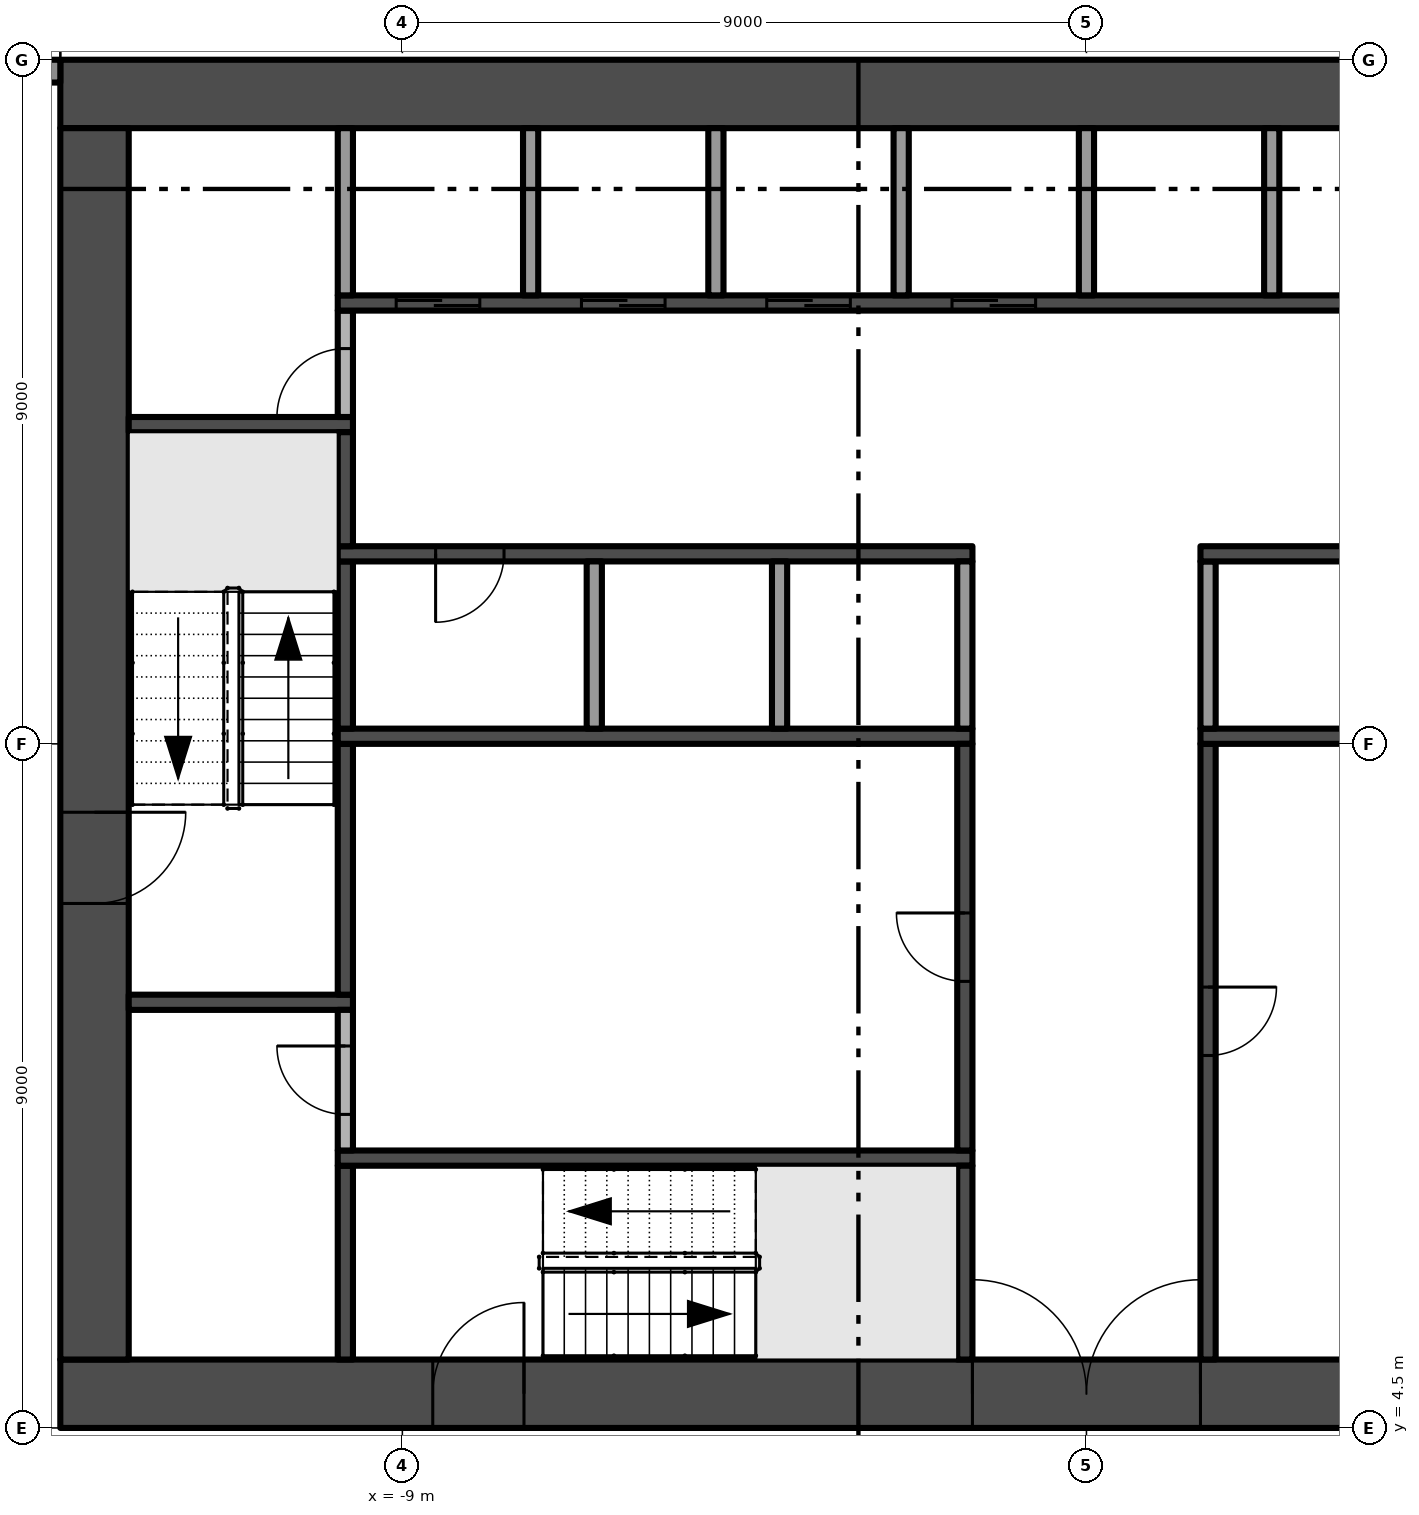
"""IFC4 building model, lengths in metres.
Left out: names, types, materials, properties, quantities, classifications, styles, units other than length and angle.
Written with IfcOpenShell. Run it as: python <this file> out.ifc"""

import sys

from ifc_helpers import new_model, si_unit, direction, frame, frame_2d, origin, place, context, subcontext, project, spatial, rectangle, extrude, element, fill, save


model = new_model("IFC4")
c1 = context("Model", 3, precision=1e-05, world=origin(), true_north=direction((0.0, 1.0)))
c2 = subcontext(c1, "Body", "Model", "MODEL_VIEW")
j1 = project(units=[si_unit("LENGTHUNIT", "METRE"), si_unit("PLANEANGLEUNIT", "RADIAN")], contexts=[c1])
p1 = place(None, origin())
s1 = spatial("IfcSite", under=j1, at=p1, CompositionType="ELEMENT")
p2 = place(p1, origin())
s2 = spatial("IfcBuilding", under=s1, at=p2, CompositionType="ELEMENT")
p3 = place(p2, frame((0.0, 0.0, 26.4)))
s3 = spatial("IfcBuildingStorey", under=s2, at=p3, CompositionType="ELEMENT", Elevation=26.4)
p4 = place(p3, frame((-13.5, 4.95, -0.3), z_axis=(0.0, 0.0, 1.0), x_axis=(1.0, 0.0, 0.0)))
e1 = element("IfcWall", 1, at=p4, inside=s3, PredefinedType="SHEAR", context=c2, shape_type="SweptSolid", body=[
    extrude(rectangle(XDim=27.0, YDim=0.9, at=frame_2d((13.5, 0.0))), origin(), (0.0, 0.0, 1.0), 3.8),
])
p5 = place(p4, frame((12.0, 0.0, 0.3)))
e2 = element("IfcOpeningElement", 2, at=p5, cuts=e1, PredefinedType="OPENING", context=c2, shape_type="SweptSolid", body=[
    extrude(rectangle(XDim=3.0, YDim=2.4, at=frame_2d((1.5, 1.2))), frame((0.0, 0.46, 0.0), z_axis=(0.0, -1.0, 0.0), x_axis=(1.0, 0.0, 0.0)), (0.0, 0.0, 1.0), 0.92),
])
p6 = place(p4, frame((4.9, 0.0, 0.3)))
e3 = element("IfcOpeningElement", 3, at=p6, cuts=e1, PredefinedType="OPENING", context=c2, shape_type="SweptSolid", body=[
    extrude(rectangle(XDim=1.2, YDim=2.2, at=frame_2d((0.6, 1.1))), frame((0.0, 0.46, 0.0), z_axis=(0.0, -1.0, 0.0), x_axis=(1.0, 0.0, 0.0)), (0.0, 0.0, 1.0), 0.92),
])
p7 = place(p4, frame((20.75, 0.0, 0.3)))
e4 = element("IfcOpeningElement", 4, at=p7, cuts=e1, PredefinedType="OPENING", context=c2, shape_type="SweptSolid", body=[
    extrude(rectangle(XDim=1.5, YDim=2.2, at=frame_2d((0.75, 1.1))), frame((0.0, 0.46, 0.0), z_axis=(0.0, -1.0, 0.0), x_axis=(1.0, 0.0, 0.0)), (0.0, 0.0, 1.0), 0.92),
])
p8 = place(p4, frame((17.4, 0.0, 0.3)))
e5 = element("IfcOpeningElement", 5, at=p8, cuts=e1, PredefinedType="OPENING", context=c2, shape_type="SweptSolid", body=[
    extrude(rectangle(XDim=1.2, YDim=2.2, at=frame_2d((0.6, 1.1))), frame((0.0, 0.46, 0.0), z_axis=(0.0, -1.0, 0.0), x_axis=(1.0, 0.0, 0.0)), (0.0, 0.0, 1.0), 0.92),
])
p9 = place(p3, frame((13.5, 22.05, -0.3), z_axis=(0.0, 0.0, 1.0), x_axis=(-1.0, 0.0, 0.0)))
e6 = element("IfcWall", 6, at=p9, inside=s3, PredefinedType="SHEAR", context=c2, shape_type="SweptSolid", body=[
    extrude(rectangle(XDim=27.0, YDim=0.9, at=frame_2d((13.5, 0.0))), origin(), (0.0, 0.0, 1.0), 3.8),
])
p10 = place(p3, frame((-13.05, 21.6, -0.3), z_axis=(0.0, 0.0, 1.0), x_axis=(0.0, -1.0, 0.0)))
e7 = element("IfcWall", 7, at=p10, inside=s3, PredefinedType="SHEAR", context=c2, shape_type="SweptSolid", body=[
    extrude(rectangle(XDim=16.2, YDim=0.9, at=frame_2d((8.1, 0.0))), origin(), (0.0, 0.0, 1.0), 3.8),
])
p11 = place(p10, frame((9.0, 0.0, 0.3)))
e8 = element("IfcOpeningElement", 8, at=p11, cuts=e7, PredefinedType="OPENING", context=c2, shape_type="SweptSolid", body=[
    extrude(rectangle(XDim=1.2, YDim=2.2, at=frame_2d((0.6, 1.1))), frame((0.0, 0.46, 0.0), z_axis=(0.0, -1.0, 0.0), x_axis=(1.0, 0.0, 0.0)), (0.0, 0.0, 1.0), 0.92),
])
p12 = place(p3, frame((-17.275, 22.35, 0.0), z_axis=(0.0, 0.0, 1.0), x_axis=(1.0, 0.0, 0.0)))
e9 = element("IfcWall", 9, at=p12, inside=s3, PredefinedType="SOLIDWALL", context=c2, shape_type="SweptSolid", body=[
    extrude(rectangle(XDim=3.775, YDim=0.3, at=frame_2d((1.887, 0.0))), origin(), (0.0, 0.0, 1.0), 3.5),
])
p13 = place(p12, frame((0.525, 0.0, 0.0)))
e10 = element("IfcOpeningElement", 10, at=p13, cuts=e9, PredefinedType="OPENING", context=c2, shape_type="SweptSolid", body=[
    extrude(rectangle(XDim=2.4, YDim=2.4, at=frame_2d((1.2, 1.2))), frame((0.0, 0.16, 0.0), z_axis=(0.0, -1.0, 0.0), x_axis=(1.0, 0.0, 0.0)), (0.0, 0.0, 1.0), 0.32),
])
for number, where, z_axis, x_axis in (
    (11, (-12.6, 10.1, 0.0), (0.0, 0.0, 1.0), (1.0, 0.0, 0.0)),
    (12, (-12.6, 17.7, 0.0), (0.0, 0.0, 1.0), (1.0, 0.0, 0.0)),
):
    element("IfcWall", number, at=place(p3, frame(where, z_axis=z_axis, x_axis=x_axis)), inside=s3, PredefinedType="SHEAR", context=c2, shape_type="SweptSolid", body=[
        extrude(rectangle(XDim=2.95, YDim=0.2, at=frame_2d((1.475, 0.0))), origin(), (0.0, 0.0, 1.0), 3.5),
    ])
p14 = place(p3, frame((-9.75, 5.4, 0.0), z_axis=(0.0, 0.0, 1.0), x_axis=(0.0, 1.0, 0.0)))
e13 = element("IfcWall", 13, at=p14, inside=s3, PredefinedType="SHEAR", context=c2, shape_type="SweptSolid", body=[
    extrude(rectangle(XDim=2.55, YDim=0.2, at=frame_2d((1.275, 0.0))), origin(), (0.0, 0.0, 1.0), 3.5),
])
p15 = place(p3, frame((-9.85, 8.05, 0.0), z_axis=(0.0, 0.0, 1.0), x_axis=(1.0, 0.0, 0.0)))
e14 = element("IfcWall", 14, at=p15, inside=s3, PredefinedType="SHEAR", context=c2, shape_type="SweptSolid", body=[
    extrude(rectangle(XDim=8.35, YDim=0.2, at=frame_2d((4.175, 0.0))), origin(), (0.0, 0.0, 1.0), 3.5),
])
p16 = place(p3, frame((-9.75, 8.15, 0.0), z_axis=(0.0, 0.0, 1.0), x_axis=(0.0, 1.0, 0.0)))
e15 = element("IfcWall", 15, at=p16, inside=s3, PredefinedType="PARTITIONING", context=c2, shape_type="SweptSolid", body=[
    extrude(rectangle(XDim=1.85, YDim=0.2, at=frame_2d((0.925, 0.0))), origin(), (0.0, 0.0, 1.0), 3.5),
])
p17 = place(p16, frame((0.475, 0.0, 0.0)))
e16 = element("IfcOpeningElement", 16, at=p17, cuts=e15, PredefinedType="OPENING", context=c2, shape_type="SweptSolid", body=[
    extrude(rectangle(XDim=0.9, YDim=2.1, at=frame_2d((0.45, 1.05))), frame((0.0, 0.11, 0.0), z_axis=(0.0, -1.0, 0.0), x_axis=(1.0, 0.0, 0.0)), (0.0, 0.0, 1.0), 0.22),
])
p18 = place(p3, frame((-9.75, 10.2, 0.0), z_axis=(0.0, 0.0, 1.0), x_axis=(0.0, 1.0, 0.0)))
e17 = element("IfcWall", 17, at=p18, inside=s3, PredefinedType="SHEAR", context=c2, shape_type="SweptSolid", body=[
    extrude(rectangle(XDim=3.3, YDim=0.2, at=frame_2d((1.65, 0.0))), origin(), (0.0, 0.0, 1.0), 3.5),
])
p19 = place(p3, frame((-9.85, 13.6, 0.0), z_axis=(0.0, 0.0, 1.0), x_axis=(1.0, 0.0, 0.0)))
e18 = element("IfcWall", 18, at=p19, inside=s3, PredefinedType="SHEAR", context=c2, shape_type="SweptSolid", body=[
    extrude(rectangle(XDim=8.35, YDim=0.2, at=frame_2d((4.175, 0.0))), origin(), (0.0, 0.0, 1.0), 3.5),
])
p20 = place(p3, frame((-9.75, 13.7, 0.0), z_axis=(0.0, 0.0, 1.0), x_axis=(0.0, 1.0, 0.0)))
e19 = element("IfcWall", 19, at=p20, inside=s3, PredefinedType="SHEAR", context=c2, shape_type="SweptSolid", body=[
    extrude(rectangle(XDim=2.2, YDim=0.2, at=frame_2d((1.1, 0.0))), origin(), (0.0, 0.0, 1.0), 3.5),
])
p21 = place(p3, frame((-1.5, 16.0, 0.0), z_axis=(0.0, 0.0, 1.0), x_axis=(-1.0, 0.0, 0.0)))
e20 = element("IfcWall", 20, at=p21, inside=s3, PredefinedType="SHEAR", context=c2, shape_type="SweptSolid", body=[
    extrude(rectangle(XDim=8.35, YDim=0.2, at=frame_2d((4.175, 0.0))), origin(), (0.0, 0.0, 1.0), 3.5),
])
p22 = place(p21, frame((6.162, 0.0, 0.0)))
e21 = element("IfcOpeningElement", 21, at=p22, cuts=e20, PredefinedType="OPENING", context=c2, shape_type="SweptSolid", body=[
    extrude(rectangle(XDim=0.9, YDim=2.1, at=frame_2d((0.45, 1.05))), frame((0.0, 0.11, 0.0), z_axis=(0.0, -1.0, 0.0), x_axis=(1.0, 0.0, 0.0)), (0.0, 0.0, 1.0), 0.22),
])
p23 = place(p3, frame((-9.75, 16.1, 0.0), z_axis=(0.0, 0.0, 1.0), x_axis=(0.0, 1.0, 0.0)))
e22 = element("IfcWall", 22, at=p23, inside=s3, PredefinedType="SHEAR", context=c2, shape_type="SweptSolid", body=[
    extrude(rectangle(XDim=1.5, YDim=0.2, at=frame_2d((0.75, 0.0))), origin(), (0.0, 0.0, 1.0), 3.5),
])
p24 = place(p3, frame((-9.75, 17.8, 0.0), z_axis=(0.0, 0.0, 1.0), x_axis=(0.0, 1.0, 0.0)))
e23 = element("IfcWall", 23, at=p24, inside=s3, PredefinedType="PARTITIONING", context=c2, shape_type="SweptSolid", body=[
    extrude(rectangle(XDim=1.4, YDim=0.2, at=frame_2d((0.7, 0.0))), origin(), (0.0, 0.0, 1.0), 3.5),
])
p25 = place(p24, origin())
e24 = element("IfcOpeningElement", 24, at=p25, cuts=e23, PredefinedType="OPENING", context=c2, shape_type="SweptSolid", body=[
    extrude(rectangle(XDim=0.9, YDim=2.1, at=frame_2d((0.45, 1.05))), frame((0.0, 0.11, 0.0), z_axis=(0.0, -1.0, 0.0), x_axis=(1.0, 0.0, 0.0)), (0.0, 0.0, 1.0), 0.22),
])
p26 = place(p3, frame((-9.85, 19.3, 0.0), z_axis=(0.0, 0.0, 1.0), x_axis=(1.0, 0.0, 0.0)))
e25 = element("IfcWall", 25, at=p26, inside=s3, PredefinedType="SHEAR", context=c2, shape_type="SweptSolid", body=[
    extrude(rectangle(XDim=19.7, YDim=0.2, at=frame_2d((9.85, 0.0))), origin(), (0.0, 0.0, 1.0), 3.5),
])
p27 = place(p26, frame((0.769, 0.0, 0.0)))
e26 = element("IfcOpeningElement", 26, at=p27, cuts=e25, PredefinedType="OPENING", context=c2, shape_type="SweptSolid", body=[
    extrude(rectangle(XDim=1.1, YDim=2.1, at=frame_2d((0.55, 1.05))), frame((0.0, 0.11, 0.0), z_axis=(0.0, -1.0, 0.0), x_axis=(1.0, 0.0, 0.0)), (0.0, 0.0, 1.0), 0.22),
])
p28 = place(p26, frame((3.206, 0.0, 0.0)))
e27 = element("IfcOpeningElement", 27, at=p28, cuts=e25, PredefinedType="OPENING", context=c2, shape_type="SweptSolid", body=[
    extrude(rectangle(XDim=1.1, YDim=2.1, at=frame_2d((0.55, 1.05))), frame((0.0, 0.11, 0.0), z_axis=(0.0, -1.0, 0.0), x_axis=(1.0, 0.0, 0.0)), (0.0, 0.0, 1.0), 0.22),
])
p29 = place(p26, frame((5.644, 0.0, 0.0)))
e28 = element("IfcOpeningElement", 28, at=p29, cuts=e25, PredefinedType="OPENING", context=c2, shape_type="SweptSolid", body=[
    extrude(rectangle(XDim=1.1, YDim=2.1, at=frame_2d((0.55, 1.05))), frame((0.0, 0.11, 0.0), z_axis=(0.0, -1.0, 0.0), x_axis=(1.0, 0.0, 0.0)), (0.0, 0.0, 1.0), 0.22),
])
p30 = place(p26, frame((8.081, 0.0, 0.0)))
e29 = element("IfcOpeningElement", 29, at=p30, cuts=e25, PredefinedType="OPENING", context=c2, shape_type="SweptSolid", body=[
    extrude(rectangle(XDim=1.1, YDim=2.1, at=frame_2d((0.55, 1.05))), frame((0.0, 0.11, 0.0), z_axis=(0.0, -1.0, 0.0), x_axis=(1.0, 0.0, 0.0)), (0.0, 0.0, 1.0), 0.22),
])
for number, where, z_axis, x_axis in (
    (30, (-9.75, 19.4, 0.0), (0.0, 0.0, 1.0), (0.0, 1.0, 0.0)),
    (31, (-7.312, 19.4, 0.0), (0.0, 0.0, 1.0), (0.0, 1.0, 0.0)),
    (32, (-6.475, 13.7, 0.0), (0.0, 0.0, 1.0), (0.0, 1.0, 0.0)),
    (33, (-4.875, 19.4, 0.0), (0.0, 0.0, 1.0), (0.0, 1.0, 0.0)),
    (34, (-4.037, 13.7, 0.0), (0.0, 0.0, 1.0), (0.0, 1.0, 0.0)),
    (35, (-2.438, 19.4, 0.0), (0.0, 0.0, 1.0), (0.0, 1.0, 0.0)),
):
    element("IfcWall", number, at=place(p3, frame(where, z_axis=z_axis, x_axis=x_axis)), inside=s3, PredefinedType="PARTITIONING", context=c2, shape_type="SweptSolid", body=[
        extrude(rectangle(XDim=2.2, YDim=0.2, at=frame_2d((1.1, 0.0))), origin(), (0.0, 0.0, 1.0), 3.5),
    ])
p31 = place(p3, frame((-1.6, 5.4, 0.0), z_axis=(0.0, 0.0, 1.0), x_axis=(0.0, 1.0, 0.0)))
e36 = element("IfcWall", 36, at=p31, inside=s3, PredefinedType="SHEAR", context=c2, shape_type="SweptSolid", body=[
    extrude(rectangle(XDim=2.55, YDim=0.2, at=frame_2d((1.275, 0.0))), origin(), (0.0, 0.0, 1.0), 3.5),
])
p32 = place(p3, frame((-1.6, 8.15, 0.0), z_axis=(0.0, 0.0, 1.0), x_axis=(0.0, 1.0, 0.0)))
e37 = element("IfcWall", 37, at=p32, inside=s3, PredefinedType="SHEAR", context=c2, shape_type="SweptSolid", body=[
    extrude(rectangle(XDim=5.35, YDim=0.2, at=frame_2d((2.675, 0.0))), origin(), (0.0, 0.0, 1.0), 3.5),
])
p33 = place(p32, frame((2.225, 0.0, 0.0)))
e38 = element("IfcOpeningElement", 38, at=p33, cuts=e37, PredefinedType="OPENING", context=c2, shape_type="SweptSolid", body=[
    extrude(rectangle(XDim=0.9, YDim=2.1, at=frame_2d((0.45, 1.05))), frame((0.0, 0.11, 0.0), z_axis=(0.0, -1.0, 0.0), x_axis=(1.0, 0.0, 0.0)), (0.0, 0.0, 1.0), 0.22),
])
for number, where, z_axis, x_axis in (
    (39, (-1.6, 13.7, 0.0), (0.0, 0.0, 1.0), (0.0, 1.0, 0.0)),
    (40, (0.0, 19.4, 0.0), (0.0, 0.0, 1.0), (0.0, 1.0, 0.0)),
):
    element("IfcWall", number, at=place(p3, frame(where, z_axis=z_axis, x_axis=x_axis)), inside=s3, PredefinedType="PARTITIONING", context=c2, shape_type="SweptSolid", body=[
        extrude(rectangle(XDim=2.2, YDim=0.2, at=frame_2d((1.1, 0.0))), origin(), (0.0, 0.0, 1.0), 3.5),
    ])
p34 = place(p3, frame((1.6, 13.5, 0.0), z_axis=(0.0, 0.0, 1.0), x_axis=(0.0, -1.0, 0.0)))
e41 = element("IfcWall", 41, at=p34, inside=s3, PredefinedType="SHEAR", context=c2, shape_type="SweptSolid", body=[
    extrude(rectangle(XDim=8.1, YDim=0.2, at=frame_2d((4.05, 0.0))), origin(), (0.0, 0.0, 1.0), 3.5),
])
p35 = place(p34, frame((3.2, 0.0, 0.0)))
e42 = element("IfcOpeningElement", 42, at=p35, cuts=e41, PredefinedType="OPENING", context=c2, shape_type="SweptSolid", body=[
    extrude(rectangle(XDim=0.9, YDim=2.1, at=frame_2d((0.45, 1.05))), frame((0.0, 0.11, 0.0), z_axis=(0.0, -1.0, 0.0), x_axis=(1.0, 0.0, 0.0)), (0.0, 0.0, 1.0), 0.22),
])
p36 = place(p3, frame((1.5, 13.6, 0.0), z_axis=(0.0, 0.0, 1.0), x_axis=(1.0, 0.0, 0.0)))
e43 = element("IfcWall", 43, at=p36, inside=s3, PredefinedType="SHEAR", context=c2, shape_type="SweptSolid", body=[
    extrude(rectangle(XDim=5.075, YDim=0.2, at=frame_2d((2.538, 0.0))), origin(), (0.0, 0.0, 1.0), 3.5),
])
p37 = place(p3, frame((1.6, 13.7, 0.0), z_axis=(0.0, 0.0, 1.0), x_axis=(0.0, 1.0, 0.0)))
e44 = element("IfcWall", 44, at=p37, inside=s3, PredefinedType="PARTITIONING", context=c2, shape_type="SweptSolid", body=[
    extrude(rectangle(XDim=2.2, YDim=0.2, at=frame_2d((1.1, 0.0))), origin(), (0.0, 0.0, 1.0), 3.5),
])
p38 = place(p3, frame((9.85, 16.0, 0.0), z_axis=(0.0, 0.0, 1.0), x_axis=(-1.0, 0.0, 0.0)))
e45 = element("IfcWall", 45, at=p38, inside=s3, PredefinedType="SHEAR", context=c2, shape_type="SweptSolid", body=[
    extrude(rectangle(XDim=8.35, YDim=0.2, at=frame_2d((4.175, 0.0))), origin(), (0.0, 0.0, 1.0), 3.5),
])
p39 = place(p38, frame((1.288, 0.0, 0.0)))
e46 = element("IfcOpeningElement", 46, at=p39, cuts=e45, PredefinedType="OPENING", context=c2, shape_type="SweptSolid", body=[
    extrude(rectangle(XDim=0.9, YDim=2.1, at=frame_2d((0.45, 1.05))), frame((0.0, 0.11, 0.0), z_axis=(0.0, -1.0, 0.0), x_axis=(1.0, 0.0, 0.0)), (0.0, 0.0, 1.0), 0.22),
])
p40 = place(p3, frame((2.438, 19.4, 0.0), z_axis=(0.0, 0.0, 1.0), x_axis=(0.0, 1.0, 0.0)))
e47 = element("IfcWall", 47, at=p40, inside=s3, PredefinedType="PARTITIONING", context=c2, shape_type="SweptSolid", body=[
    extrude(rectangle(XDim=2.2, YDim=0.2, at=frame_2d((1.1, 0.0))), origin(), (0.0, 0.0, 1.0), 3.5),
])
p41 = place(p5, frame((3.0, 0.0, 0.0), z_axis=(0.0, 0.0, 1.0), x_axis=(-1.0, 0.0, 0.0)))
e48 = element("IfcDoor", 48, at=p41, inside=s3, OperationType="DOUBLE_DOOR_SINGLE_SWING", PredefinedType="DOOR", context=c2, shape_type="SweptSolid", body=[
    extrude(rectangle(XDim=3.0, YDim=2.4, at=frame_2d((1.5, 1.2))), frame((0.0, 0.025, 0.0), z_axis=(0.0, -1.0, 0.0), x_axis=(1.0, 0.0, 0.0)), (0.0, 0.0, 1.0), 0.05),
])
fill(e2, e48)
p42 = place(p11, frame((1.2, 0.0, 0.0), z_axis=(0.0, 0.0, 1.0), x_axis=(-1.0, 0.0, 0.0)))
e49 = element("IfcDoor", 49, at=p42, inside=s3, OperationType="SINGLE_SWING_RIGHT", PredefinedType="DOOR", context=c2, shape_type="SweptSolid", body=[
    extrude(rectangle(XDim=1.2, YDim=2.2, at=frame_2d((0.6, 1.1))), frame((0.0, 0.025, 0.0), z_axis=(0.0, -1.0, 0.0), x_axis=(1.0, 0.0, 0.0)), (0.0, 0.0, 1.0), 0.05),
])
fill(e8, e49)
p43 = place(p6, frame((1.2, 0.0, 0.0), z_axis=(0.0, 0.0, 1.0), x_axis=(-1.0, 0.0, 0.0)))
e50 = element("IfcDoor", 50, at=p43, inside=s3, OperationType="SINGLE_SWING_LEFT", PredefinedType="DOOR", context=c2, shape_type="SweptSolid", body=[
    extrude(rectangle(XDim=1.2, YDim=2.2, at=frame_2d((0.6, 1.1))), frame((0.0, 0.025, 0.0), z_axis=(0.0, -1.0, 0.0), x_axis=(1.0, 0.0, 0.0)), (0.0, 0.0, 1.0), 0.05),
])
fill(e3, e50)
p44 = place(p27, origin())
e51 = element("IfcDoor", 51, at=p44, inside=s3, OperationType="SLIDING_TO_LEFT", PredefinedType="DOOR", context=c2, shape_type="SweptSolid", body=[
    extrude(rectangle(XDim=1.1, YDim=2.1, at=frame_2d((0.55, 1.05))), frame((0.0, 0.025, 0.0), z_axis=(0.0, -1.0, 0.0), x_axis=(1.0, 0.0, 0.0)), (0.0, 0.0, 1.0), 0.05),
])
fill(e26, e51)
p45 = place(p28, origin())
e52 = element("IfcDoor", 52, at=p45, inside=s3, OperationType="SLIDING_TO_LEFT", PredefinedType="DOOR", context=c2, shape_type="SweptSolid", body=[
    extrude(rectangle(XDim=1.1, YDim=2.1, at=frame_2d((0.55, 1.05))), frame((0.0, 0.025, 0.0), z_axis=(0.0, -1.0, 0.0), x_axis=(1.0, 0.0, 0.0)), (0.0, 0.0, 1.0), 0.05),
])
fill(e27, e52)
p46 = place(p29, origin())
e53 = element("IfcDoor", 53, at=p46, inside=s3, OperationType="SLIDING_TO_LEFT", PredefinedType="DOOR", context=c2, shape_type="SweptSolid", body=[
    extrude(rectangle(XDim=1.1, YDim=2.1, at=frame_2d((0.55, 1.05))), frame((0.0, 0.025, 0.0), z_axis=(0.0, -1.0, 0.0), x_axis=(1.0, 0.0, 0.0)), (0.0, 0.0, 1.0), 0.05),
])
fill(e28, e53)
p47 = place(p30, origin())
e54 = element("IfcDoor", 54, at=p47, inside=s3, OperationType="SLIDING_TO_LEFT", PredefinedType="DOOR", context=c2, shape_type="SweptSolid", body=[
    extrude(rectangle(XDim=1.1, YDim=2.1, at=frame_2d((0.55, 1.05))), frame((0.0, 0.025, 0.0), z_axis=(0.0, -1.0, 0.0), x_axis=(1.0, 0.0, 0.0)), (0.0, 0.0, 1.0), 0.05),
])
fill(e29, e54)
p48 = place(p33, origin())
e55 = element("IfcDoor", 55, at=p48, inside=s3, OperationType="SINGLE_SWING_RIGHT", PredefinedType="DOOR", context=c2, shape_type="SweptSolid", body=[
    extrude(rectangle(XDim=0.9, YDim=2.1, at=frame_2d((0.45, 1.05))), frame((0.0, 0.025, 0.0), z_axis=(0.0, -1.0, 0.0), x_axis=(1.0, 0.0, 0.0)), (0.0, 0.0, 1.0), 0.05),
])
fill(e38, e55)
p49 = place(p22, origin())
e56 = element("IfcDoor", 56, at=p49, inside=s3, OperationType="SINGLE_SWING_RIGHT", PredefinedType="DOOR", context=c2, shape_type="SweptSolid", body=[
    extrude(rectangle(XDim=0.9, YDim=2.1, at=frame_2d((0.45, 1.05))), frame((0.0, 0.025, 0.0), z_axis=(0.0, -1.0, 0.0), x_axis=(1.0, 0.0, 0.0)), (0.0, 0.0, 1.0), 0.05),
])
fill(e21, e56)
p50 = place(p35, origin())
e57 = element("IfcDoor", 57, at=p50, inside=s3, OperationType="SINGLE_SWING_LEFT", PredefinedType="DOOR", context=c2, shape_type="SweptSolid", body=[
    extrude(rectangle(XDim=0.9, YDim=2.1, at=frame_2d((0.45, 1.05))), frame((0.0, 0.025, 0.0), z_axis=(0.0, -1.0, 0.0), x_axis=(1.0, 0.0, 0.0)), (0.0, 0.0, 1.0), 0.05),
])
fill(e42, e57)
p51 = place(p25, origin())
e58 = element("IfcDoor", 58, at=p51, inside=s3, OperationType="SINGLE_SWING_LEFT", PredefinedType="DOOR", context=c2, shape_type="SweptSolid", body=[
    extrude(rectangle(XDim=0.9, YDim=2.1, at=frame_2d((0.45, 1.05))), frame((0.0, 0.025, 0.0), z_axis=(0.0, -1.0, 0.0), x_axis=(1.0, 0.0, 0.0)), (0.0, 0.0, 1.0), 0.05),
])
fill(e24, e58)
p52 = place(p17, origin())
e59 = element("IfcDoor", 59, at=p52, inside=s3, OperationType="SINGLE_SWING_RIGHT", PredefinedType="DOOR", context=c2, shape_type="SweptSolid", body=[
    extrude(rectangle(XDim=0.9, YDim=2.1, at=frame_2d((0.45, 1.05))), frame((0.0, 0.025, 0.0), z_axis=(0.0, -1.0, 0.0), x_axis=(1.0, 0.0, 0.0)), (0.0, 0.0, 1.0), 0.05),
])
fill(e16, e59)
save(model, sys.argv[1])
